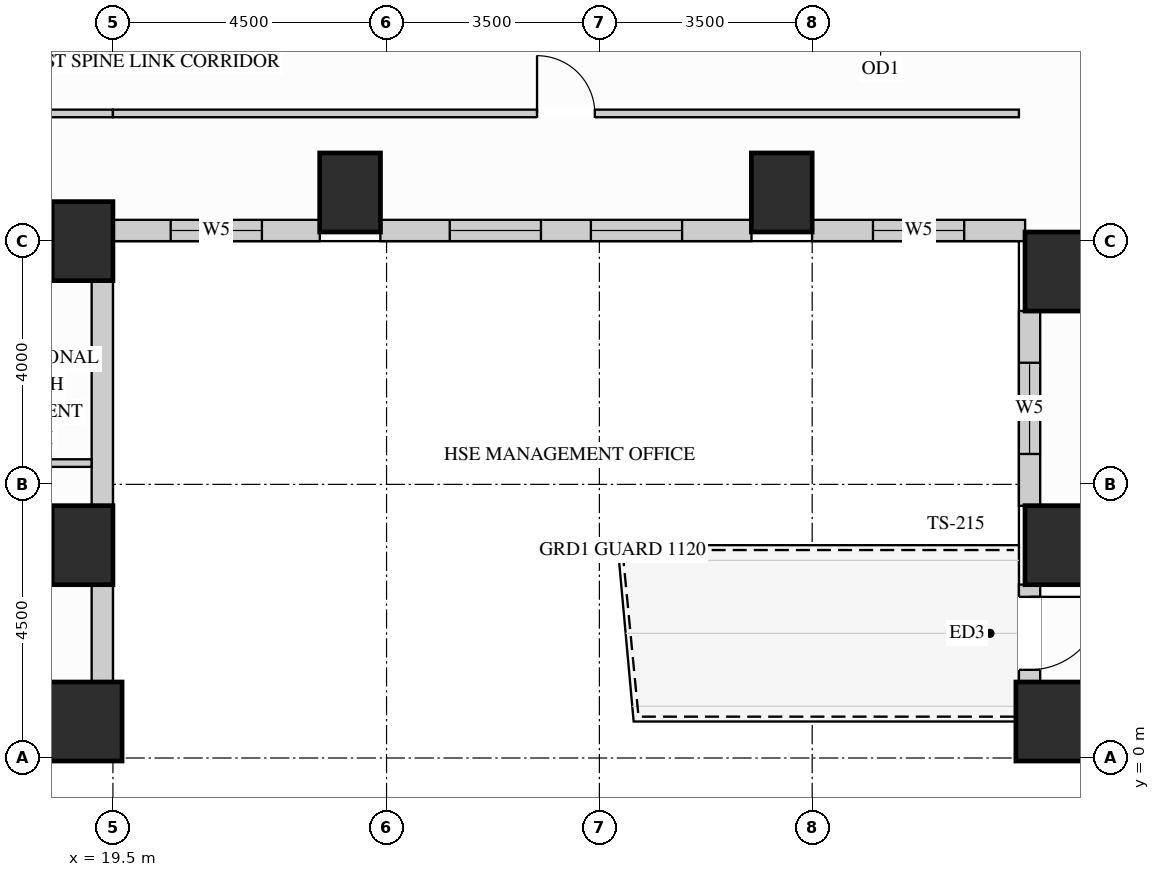
"""IFC4 building model, lengths in metres.
Left out: names, types, materials, properties, quantities, classifications, styles, units other than length and angle.
Written with IfcOpenShell. Run it as: python <this file> out.ifc"""

import sys

from ifc_helpers import new_model, si_unit, direction, frame, frame_2d, origin, origin_2d, place, context, subcontext, project, spatial, rectangle, extrude, source, transform, mapped, element, fill, save


model = new_model("IFC4")
c1 = context("Model", 3, precision=1e-05, world=origin(), true_north=direction((0.0, 1.0)))
c2 = subcontext(c1, "Body", "Model", "MODEL_VIEW")
j1 = project(units=[si_unit("LENGTHUNIT", "METRE"), si_unit("PLANEANGLEUNIT", "RADIAN")], contexts=[c1])
p1 = place(None, origin())
s1 = spatial("IfcSite", under=j1, at=p1, CompositionType="ELEMENT")
p2 = place(p1, origin())
s2 = spatial("IfcBuilding", under=s1, at=p2, CompositionType="ELEMENT")
p3 = place(p2, frame((0.0, 0.0, 33.3)))
s3 = spatial("IfcBuildingStorey", under=s2, at=p3, CompositionType="ELEMENT", Elevation=33.3)
m1 = source(origin(), c2, "Body", "SweptSolid", [
    extrude(rectangle(XDim=1.0, YDim=1.3, at=origin_2d()), origin(), (0.0, 0.0, 1.0), 3.38),
])
for number, where, z_axis, x_axis in (
    (1, (19.0, 3.5, 0.0), (0.0, 0.0, 1.0), (1.0, 0.0, 0.0)),
    (2, (19.0, 8.5, 0.0), (0.0, 0.0, 1.0), (1.0, 0.0, 0.0)),
    (3, (35.0, 3.5, 0.0), (0.0, 0.0, 1.0), (1.0, 0.0, 0.0)),
    (4, (35.0, 8.0, 0.0), (0.0, 0.0, 1.0), (1.0, 0.0, 0.0)),
    (5, (23.4, 9.3, 0.0), (0.0, 0.0, 1.0), (1.0, 0.0, 0.0)),
    (6, (30.5, 9.3, 0.0), (0.0, 0.0, 1.0), (1.0, 0.0, 0.0)),
):
    element("IfcColumn", number, at=place(p3, frame(where, z_axis=z_axis, x_axis=x_axis)), inside=s3, PredefinedType="COLUMN", context=c2, shape_type="MappedRepresentation", body=[
        mapped(m1, transform((0.0, 0.0, 0.0), x_axis=(1.0, 0.0, 0.0), y_axis=(0.0, 1.0, 0.0), z_axis=(0.0, 0.0, 1.0))),
    ])
m2 = source(origin(), c2, "Body", "SweptSolid", [
    extrude(rectangle(XDim=1.3, YDim=1.3, at=origin_2d()), origin(), (0.0, 0.0, 1.0), 3.38),
])
for number, where, z_axis, x_axis in (
    (7, (19.0, 0.6, 0.0), (0.0, 0.0, 1.0), (1.0, 0.0, 0.0)),
    (8, (35.0, 0.6, 0.0), (0.0, 0.0, 1.0), (1.0, 0.0, 0.0)),
):
    element("IfcColumn", number, at=place(p3, frame(where, z_axis=z_axis, x_axis=x_axis)), inside=s3, PredefinedType="COLUMN", context=c2, shape_type="MappedRepresentation", body=[
        mapped(m2, transform((0.0, 0.0, 0.0), x_axis=(1.0, 0.0, 0.0), y_axis=(0.0, 1.0, 0.0), z_axis=(0.0, 0.0, 1.0))),
    ])
m3 = source(origin(), c2, "Body", "SweptSolid", [
    extrude(rectangle(XDim=1.604, YDim=0.35, at=frame_2d((0.802, 0.0))), origin(), (0.0, 0.0, 1.0), 2.51),
])
p4 = place(p3, frame((19.325, 1.248, 0.0), z_axis=(0.0, 0.0, 1.0), x_axis=(0.0, 1.0, 0.0)))
e9 = element("IfcWall", 9, at=p4, inside=s3, PredefinedType="SOLIDWALL", context=c2, shape_type="MappedRepresentation", body=[
    mapped(m3, transform((0.0, 0.0, 0.0), x_axis=(1.0, 0.0, 0.0), y_axis=(0.0, 1.0, 0.0), z_axis=(0.0, 0.0, 1.0))),
])
m4 = source(origin(), c2, "Body", "SweptSolid", [
    extrude(rectangle(XDim=3.704, YDim=0.35, at=frame_2d((1.852, 0.0))), origin(), (0.0, 0.0, 1.0), 2.51),
])
p5 = place(p3, frame((19.325, 4.148, 0.0), z_axis=(0.0, 0.0, 1.0), x_axis=(0.0, 1.0, 0.0)))
e10 = element("IfcWall", 10, at=p5, inside=s3, PredefinedType="SOLIDWALL", context=c2, shape_type="MappedRepresentation", body=[
    mapped(m4, transform((0.0, 0.0, 0.0), x_axis=(1.0, 0.0, 0.0), y_axis=(0.0, 1.0, 0.0), z_axis=(0.0, 0.0, 1.0))),
])
p6 = place(p3, frame((19.498, 8.675, 0.0), z_axis=(0.0, 0.0, 1.0), x_axis=(1.0, 0.0, 0.0)))
e11 = element("IfcWall", 11, at=p6, inside=s3, PredefinedType="SOLIDWALL", context=c2, shape_type="SweptSolid", body=[
    extrude(rectangle(XDim=3.404, YDim=0.35, at=frame_2d((1.702, 0.0))), origin(), (0.0, 0.0, 1.0), 3.365),
])
p7 = place(p6, frame((0.952, 0.0, 0.78)))
e12 = element("IfcOpeningElement", 12, at=p7, cuts=e11, PredefinedType="OPENING", context=c2, shape_type="SweptSolid", body=[
    extrude(rectangle(XDim=1.5, YDim=2.0, at=frame_2d((0.75, 1.0))), frame((0.0, 0.185, 0.0), z_axis=(0.0, -1.0, 0.0), x_axis=(1.0, 0.0, 0.0)), (0.0, 0.0, 1.0), 0.37),
])
p8 = place(p3, frame((23.898, 8.675, 0.0), z_axis=(0.0, 0.0, 1.0), x_axis=(1.0, 0.0, 0.0)))
e13 = element("IfcWall", 13, at=p8, inside=s3, PredefinedType="SOLIDWALL", context=c2, shape_type="SweptSolid", body=[
    extrude(rectangle(XDim=6.104, YDim=0.35, at=frame_2d((3.052, 0.0))), origin(), (0.0, 0.0, 1.0), 3.365),
])
p9 = place(p8, frame((1.141, 0.0, 0.78)))
e14 = element("IfcOpeningElement", 14, at=p9, cuts=e13, PredefinedType="OPENING", context=c2, shape_type="SweptSolid", body=[
    extrude(rectangle(XDim=1.5, YDim=2.0, at=frame_2d((0.75, 1.0))), frame((0.0, 0.185, 0.0), z_axis=(0.0, -1.0, 0.0), x_axis=(1.0, 0.0, 0.0)), (0.0, 0.0, 1.0), 0.37),
])
p10 = place(p8, frame((3.463, 0.0, 0.78)))
e15 = element("IfcOpeningElement", 15, at=p10, cuts=e13, PredefinedType="OPENING", context=c2, shape_type="SweptSolid", body=[
    extrude(rectangle(XDim=1.5, YDim=2.0, at=frame_2d((0.75, 1.0))), frame((0.0, 0.185, 0.0), z_axis=(0.0, -1.0, 0.0), x_axis=(1.0, 0.0, 0.0)), (0.0, 0.0, 1.0), 0.37),
])
p11 = place(p3, frame((30.998, 8.675, 0.0), z_axis=(0.0, 0.0, 1.0), x_axis=(1.0, 0.0, 0.0)))
e16 = element("IfcWall", 16, at=p11, inside=s3, PredefinedType="SOLIDWALL", context=c2, shape_type="SweptSolid", body=[
    extrude(rectangle(XDim=3.504, YDim=0.35, at=frame_2d((1.752, 0.0))), origin(), (0.0, 0.0, 1.0), 3.365),
])
p12 = place(p11, frame((1.002, 0.0, 0.78)))
e17 = element("IfcOpeningElement", 17, at=p12, cuts=e16, PredefinedType="OPENING", context=c2, shape_type="SweptSolid", body=[
    extrude(rectangle(XDim=1.5, YDim=2.0, at=frame_2d((0.75, 1.0))), frame((0.0, 0.185, 0.0), z_axis=(0.0, -1.0, 0.0), x_axis=(1.0, 0.0, 0.0)), (0.0, 0.0, 1.0), 0.37),
])
p13 = place(p3, frame((34.575, 7.352, 0.0), z_axis=(0.0, 0.0, 1.0), x_axis=(0.0, -1.0, 0.0)))
e18 = element("IfcWall", 18, at=p13, inside=s3, PredefinedType="SOLIDWALL", context=c2, shape_type="SweptSolid", body=[
    extrude(rectangle(XDim=3.204, YDim=0.35, at=frame_2d((1.602, 0.0))), origin(), (0.0, 0.0, 1.0), 2.51),
])
p14 = place(p13, frame((0.852, 0.0, 0.78)))
e19 = element("IfcOpeningElement", 19, at=p14, cuts=e18, PredefinedType="OPENING", context=c2, shape_type="SweptSolid", body=[
    extrude(rectangle(XDim=1.5, YDim=1.55, at=frame_2d((0.75, 0.775))), frame((0.0, 0.185, 0.0), z_axis=(0.0, -1.0, 0.0), x_axis=(1.0, 0.0, 0.0)), (0.0, 0.0, 1.0), 0.37),
])
p15 = place(p3, frame((34.575, 2.852, 0.0), z_axis=(0.0, 0.0, 1.0), x_axis=(0.0, -1.0, 0.0)))
e20 = element("IfcWall", 20, at=p15, inside=s3, PredefinedType="SOLIDWALL", context=c2, shape_type="SweptSolid", body=[
    extrude(rectangle(XDim=1.604, YDim=0.35, at=frame_2d((0.802, 0.0))), origin(), (0.0, 0.0, 1.0), 2.51),
])
p16 = place(p15, frame((0.202, 0.0, 0.0)))
e21 = element("IfcOpeningElement", 21, at=p16, cuts=e20, PredefinedType="OPENING", context=c2, shape_type="SweptSolid", body=[
    extrude(rectangle(XDim=1.2, YDim=2.15, at=frame_2d((0.6, 1.075))), frame((0.0, 0.185, 0.0), z_axis=(0.0, -1.0, 0.0), x_axis=(1.0, 0.0, 0.0)), (0.0, 0.0, 1.0), 0.37),
])
m5 = source(origin(), c2, "Body", "SweptSolid", [
    extrude(rectangle(XDim=2.45, YDim=0.125, at=frame_2d((1.225, 0.0))), origin(), (0.0, 0.0, 1.0), 3.365),
])
p17 = place(p3, frame((17.05, 10.6, 0.0), z_axis=(0.0, 0.0, 1.0), x_axis=(1.0, 0.0, 0.0)))
e22 = element("IfcWall", 22, at=p17, inside=s3, PredefinedType="PARTITIONING", context=c2, shape_type="MappedRepresentation", body=[
    mapped(m5, transform((0.0, 0.0, 0.0), x_axis=(1.0, 0.0, 0.0), y_axis=(0.0, 1.0, 0.0), z_axis=(0.0, 0.0, 1.0))),
])
p18 = place(p3, frame((19.5, 10.6, 0.0), z_axis=(0.0, 0.0, 1.0), x_axis=(1.0, 0.0, 0.0)))
e23 = element("IfcWall", 23, at=p18, inside=s3, PredefinedType="PARTITIONING", context=c2, shape_type="SweptSolid", body=[
    extrude(rectangle(XDim=14.9, YDim=0.125, at=frame_2d((7.45, 0.0))), origin(), (0.0, 0.0, 1.0), 3.365),
])
p19 = place(p18, frame((6.975, 0.0, 0.0)))
e24 = element("IfcOpeningElement", 24, at=p19, cuts=e23, PredefinedType="OPENING", context=c2, shape_type="SweptSolid", body=[
    extrude(rectangle(XDim=0.95, YDim=2.15, at=frame_2d((0.475, 1.075))), frame((0.0, 0.073, 0.0), z_axis=(0.0, -1.0, 0.0), x_axis=(1.0, 0.0, 0.0)), (0.0, 0.0, 1.0), 0.145),
])
m6 = source(origin(), c2, "Body", "SweptSolid", [
    extrude(rectangle(XDim=2.098, YDim=0.125, at=frame_2d((1.049, 0.0))), origin(), (0.0, 0.0, 1.0), 2.828),
])
p20 = place(p3, frame((17.05, 4.85, 0.0), z_axis=(0.0, 0.0, 1.0), x_axis=(1.0, 0.0, 0.0)))
e25 = element("IfcWall", 25, at=p20, inside=s3, PredefinedType="PARTITIONING", context=c2, shape_type="MappedRepresentation", body=[
    mapped(m6, transform((0.0, 0.0, 0.0), x_axis=(1.0, 0.0, 0.0), y_axis=(0.0, 1.0, 0.0), z_axis=(0.0, 0.0, 1.0))),
])
m7 = source(origin(), c2, "Body", "SweptSolid", [
    extrude(rectangle(XDim=1.2, YDim=2.15, at=frame_2d((0.6, 1.075))), frame((0.0, 0.025, 0.0), z_axis=(0.0, -1.0, 0.0), x_axis=(1.0, 0.0, 0.0)), (0.0, 0.0, 1.0), 0.05),
])
p21 = place(p16, frame((1.2, 0.0, 0.0), z_axis=(0.0, 0.0, 1.0), x_axis=(-1.0, 0.0, 0.0)))
e26 = element("IfcDoor", 26, at=p21, inside=s3, OperationType="SINGLE_SWING_LEFT", PredefinedType="DOOR", context=c2, shape_type="MappedRepresentation", body=[
    mapped(m7, transform((0.0, 0.0, 0.0), x_axis=(1.0, 0.0, 0.0), y_axis=(0.0, 1.0, 0.0), z_axis=(0.0, 0.0, 1.0))),
])
fill(e21, e26)
m8 = source(origin(), c2, "Body", "SweptSolid", [
    extrude(rectangle(XDim=0.95, YDim=2.15, at=frame_2d((0.475, 1.075))), frame((0.0, 0.025, 0.0), z_axis=(0.0, -1.0, 0.0), x_axis=(1.0, 0.0, 0.0)), (0.0, 0.0, 1.0), 0.05),
])
p22 = place(p19, origin())
e27 = element("IfcDoor", 27, at=p22, inside=s3, OperationType="SINGLE_SWING_LEFT", PredefinedType="DOOR", context=c2, shape_type="MappedRepresentation", body=[
    mapped(m8, transform((0.0, 0.0, 0.0), x_axis=(1.0, 0.0, 0.0), y_axis=(0.0, 1.0, 0.0), z_axis=(0.0, 0.0, 1.0))),
])
fill(e24, e27)
m9 = source(origin(), c2, "Body", "SweptSolid", [
    extrude(rectangle(XDim=1.5, YDim=2.0, at=frame_2d((0.75, 1.0))), frame((0.0, 0.03, 0.0), z_axis=(0.0, -1.0, 0.0), x_axis=(1.0, 0.0, 0.0)), (0.0, 0.0, 1.0), 0.06),
])
p23 = place(p7, origin())
e28 = element("IfcWindow", 28, at=p23, inside=s3, PartitioningType="SINGLE_PANEL", PredefinedType="WINDOW", context=c2, shape_type="MappedRepresentation", body=[
    mapped(m9, transform((0.0, 0.0, 0.0), x_axis=(1.0, 0.0, 0.0), y_axis=(0.0, 1.0, 0.0), z_axis=(0.0, 0.0, 1.0))),
])
fill(e12, e28)
p24 = place(p9, origin())
e29 = element("IfcWindow", 29, at=p24, inside=s3, PartitioningType="SINGLE_PANEL", PredefinedType="WINDOW", context=c2, shape_type="MappedRepresentation", body=[
    mapped(m9, transform((0.0, 0.0, 0.0), x_axis=(1.0, 0.0, 0.0), y_axis=(0.0, 1.0, 0.0), z_axis=(0.0, 0.0, 1.0))),
])
fill(e14, e29)
p25 = place(p10, origin())
e30 = element("IfcWindow", 30, at=p25, inside=s3, PartitioningType="SINGLE_PANEL", PredefinedType="WINDOW", context=c2, shape_type="MappedRepresentation", body=[
    mapped(m9, transform((0.0, 0.0, 0.0), x_axis=(1.0, 0.0, 0.0), y_axis=(0.0, 1.0, 0.0), z_axis=(0.0, 0.0, 1.0))),
])
fill(e15, e30)
p26 = place(p12, origin())
e31 = element("IfcWindow", 31, at=p26, inside=s3, PartitioningType="SINGLE_PANEL", PredefinedType="WINDOW", context=c2, shape_type="MappedRepresentation", body=[
    mapped(m9, transform((0.0, 0.0, 0.0), x_axis=(1.0, 0.0, 0.0), y_axis=(0.0, 1.0, 0.0), z_axis=(0.0, 0.0, 1.0))),
])
fill(e17, e31)
m10 = source(origin(), c2, "Body", "SweptSolid", [
    extrude(rectangle(XDim=1.5, YDim=1.55, at=frame_2d((0.75, 0.775))), frame((0.0, 0.03, 0.0), z_axis=(0.0, -1.0, 0.0), x_axis=(1.0, 0.0, 0.0)), (0.0, 0.0, 1.0), 0.06),
])
p27 = place(p14, origin())
e32 = element("IfcWindow", 32, at=p27, inside=s3, PartitioningType="SINGLE_PANEL", PredefinedType="WINDOW", context=c2, shape_type="MappedRepresentation", body=[
    mapped(m10, transform((0.0, 0.0, 0.0), x_axis=(1.0, 0.0, 0.0), y_axis=(0.0, 1.0, 0.0), z_axis=(0.0, 0.0, 1.0))),
])
fill(e19, e32)
save(model, sys.argv[1])
